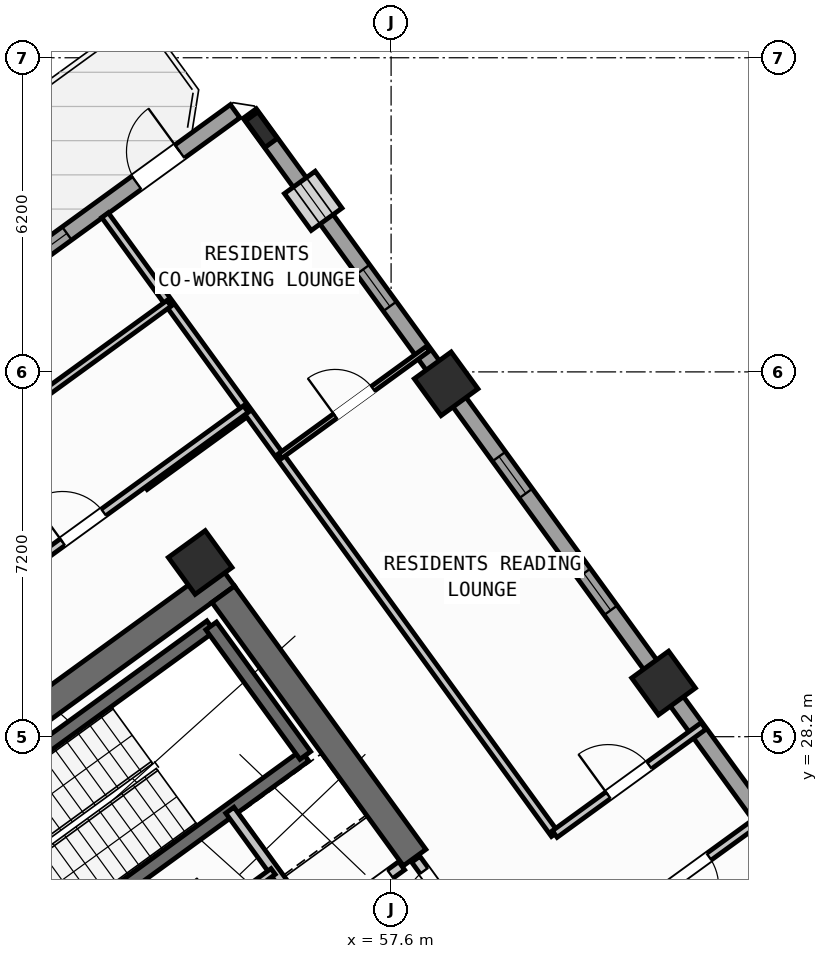
"""IFC4 building model, lengths in metres.
Left out: names, types, materials, properties, quantities, classifications, styles, units other than length and angle.
Written with IfcOpenShell. Run it as: python <this file> out.ifc"""

import sys

from ifc_helpers import new_model, si_unit, direction, frame, frame_2d, origin, origin_2d, place, context, subcontext, project, spatial, rectangle, hollow_rectangle, i_section, extrude, source, transform, mapped, element, fill, save


model = new_model("IFC4")
c1 = context("Model", 3, precision=1e-05, world=origin(), true_north=direction((0.0, 1.0)))
c2 = subcontext(c1, "Body", "Model", "MODEL_VIEW")
j1 = project(units=[si_unit("LENGTHUNIT", "METRE"), si_unit("PLANEANGLEUNIT", "RADIAN")], contexts=[c1])
p1 = place(None, origin())
s1 = spatial("IfcSite", under=j1, at=p1, CompositionType="ELEMENT")
p2 = place(p1, origin())
s2 = spatial("IfcBuilding", under=s1, at=p2, CompositionType="ELEMENT")
p3 = place(p2, frame((0.0, 0.0, 123.3)))
s3 = spatial("IfcBuildingStorey", under=s2, at=p3, CompositionType="ELEMENT", Elevation=123.3)
p4 = place(p3, frame((44.365, 24.142, 0.0), z_axis=(0.0, 0.0, 1.0), x_axis=(0.809024304885, 0.587775190107, 0.0)))
e1 = element("IfcWall", 1, at=p4, inside=s3, PredefinedType="SHEAR", context=c2, shape_type="SweptSolid", body=[
    extrude(rectangle(XDim=12.34, YDim=0.55, at=frame_2d((6.17, 0.0))), origin(), (0.0, 0.0, 1.0), 4.22),
])
p5 = place(p3, frame((58.064, 25.813, 0.0), z_axis=(0.0, 0.0, 1.0), x_axis=(-0.587764933797, 0.809031756236, 0.0)))
e2 = element("IfcWall", 2, at=p5, inside=s3, PredefinedType="SHEAR", context=c2, shape_type="SweptSolid", body=[
    extrude(rectangle(XDim=6.425, YDim=0.55, at=frame_2d((3.212, 0.0))), origin(), (0.0, 0.0, 1.0), 4.22),
])
m1 = source(origin(), c2, "Body", "SweptSolid", [
    extrude(hollow_rectangle(XDim=0.9, YDim=0.9, WallThickness=0.036, at=origin_2d()), origin(), (0.0, 0.0, 1.0), 4.5),
])
for number, where, z_axis, x_axis in (
    (3, (53.832, 31.638, 0.0), (0.0, 0.0, 1.0), (0.809, 0.588, 0.0)),
    (4, (62.977, 29.259, 0.0), (0.0, 0.0, 1.0), (0.809, 0.588, 0.0)),
    (5, (58.686, 35.165, 0.0), (0.0, 0.0, 1.0), (0.809, 0.588, 0.0)),
):
    element("IfcColumn", number, at=place(p3, frame(where, z_axis=z_axis, x_axis=x_axis)), inside=s3, PredefinedType="COLUMN", context=c2, shape_type="MappedRepresentation", body=[
        mapped(m1, transform((0.0, 0.0, 0.0), scale=1.0)),
    ])
m2 = source(origin(), c2, "Body", "SweptSolid", [
    extrude(i_section(OverallWidth=0.3, OverallDepth=0.65, WebThickness=0.016, FlangeThickness=0.031, at=origin_2d()), origin(), (0.0, 0.0, 1.0), 4.5),
])
p6 = place(p3, frame((55.042, 40.181, 0.0), z_axis=(0.0, 0.0, 1.0), x_axis=(0.809016994375, 0.587785252292, 0.0)))
e6 = element("IfcColumn", 6, at=p6, inside=s3, PredefinedType="COLUMN", context=c2, shape_type="MappedRepresentation", body=[
    mapped(m2, transform((0.0, 0.0, 0.0), scale=1.0)),
])
p7 = place(p3, frame((42.207, 31.597, 0.0), z_axis=(0.0, 0.0, 1.0), x_axis=(0.809020333377, 0.587780656523, 0.0)))
e7 = element("IfcWall", 7, at=p7, inside=s3, PredefinedType="STANDARD", context=c2, shape_type="SweptSolid", body=[
    extrude(rectangle(XDim=15.223, YDim=0.32, at=frame_2d((7.611, 0.0))), origin(), (0.0, 0.0, 1.0), 4.22),
])
p8 = place(p7, frame((12.82, 0.0, 0.0)))
e8 = element("IfcOpeningElement", 8, at=p8, cuts=e7, PredefinedType="OPENING", context=c2, shape_type="SweptSolid", body=[
    extrude(rectangle(XDim=1.05, YDim=2.15, at=frame_2d((0.525, 1.075))), frame((0.0, 0.17, 0.0), z_axis=(0.0, -1.0, 0.0), x_axis=(1.0, 0.0, 0.0)), (0.0, 0.0, 1.0), 0.34),
])
p9 = place(p7, frame((1.52, 0.0, 0.8)))
e9 = element("IfcOpeningElement", 9, at=p9, cuts=e7, PredefinedType="OPENING", context=c2, shape_type="SweptSolid", body=[
    extrude(rectangle(XDim=2.1, YDim=1.55, at=frame_2d((1.05, 0.775))), frame((0.0, 0.17, 0.0), z_axis=(0.0, -1.0, 0.0), x_axis=(1.0, 0.0, 0.0)), (0.0, 0.0, 1.0), 0.34),
])
p10 = place(p7, frame((5.76, 0.0, 0.8)))
e10 = element("IfcOpeningElement", 10, at=p10, cuts=e7, PredefinedType="OPENING", context=c2, shape_type="SweptSolid", body=[
    extrude(rectangle(XDim=2.1, YDim=1.55, at=frame_2d((1.05, 0.775))), frame((0.0, 0.17, 0.0), z_axis=(0.0, -1.0, 0.0), x_axis=(1.0, 0.0, 0.0)), (0.0, 0.0, 1.0), 0.34),
])
p11 = place(p7, frame((10.219, 0.0, 1.0)))
e11 = element("IfcOpeningElement", 11, at=p11, cuts=e7, PredefinedType="OPENING", context=c2, shape_type="SweptSolid", body=[
    extrude(rectangle(XDim=0.9, YDim=1.25, at=frame_2d((0.45, 0.625))), frame((0.0, 0.17, 0.0), z_axis=(0.0, -1.0, 0.0), x_axis=(1.0, 0.0, 0.0)), (0.0, 0.0, 1.0), 0.34),
])
p12 = place(p3, frame((54.81, 40.5, 0.0), z_axis=(0.0, 0.0, 1.0), x_axis=(0.587783625747, -0.809018176127, 0.0)))
e12 = element("IfcWall", 12, at=p12, inside=s3, PredefinedType="STANDARD", context=c2, shape_type="SweptSolid", body=[
    extrude(rectangle(XDim=21.587, YDim=0.32, at=frame_2d((10.794, 0.0))), origin(), (0.0, 0.0, 1.0), 2.395),
])
p13 = place(p12, frame((1.681, 0.0, 1.0)))
e13 = element("IfcOpeningElement", 13, at=p13, cuts=e12, PredefinedType="OPENING", context=c2, shape_type="SweptSolid", body=[
    extrude(rectangle(XDim=0.9, YDim=1.25, at=frame_2d((0.45, 0.625))), frame((0.0, 0.17, 0.0), z_axis=(0.0, -1.0, 0.0), x_axis=(1.0, 0.0, 0.0)), (0.0, 0.0, 1.0), 0.34),
])
p14 = place(p12, frame((3.805, 0.0, 1.0)))
e14 = element("IfcOpeningElement", 14, at=p14, cuts=e12, PredefinedType="OPENING", context=c2, shape_type="SweptSolid", body=[
    extrude(rectangle(XDim=0.9, YDim=1.25, at=frame_2d((0.45, 0.625))), frame((0.0, 0.17, 0.0), z_axis=(0.0, -1.0, 0.0), x_axis=(1.0, 0.0, 0.0)), (0.0, 0.0, 1.0), 0.34),
])
p15 = place(p12, frame((8.369, 0.0, 1.0)))
e15 = element("IfcOpeningElement", 15, at=p15, cuts=e12, PredefinedType="OPENING", context=c2, shape_type="SweptSolid", body=[
    extrude(rectangle(XDim=0.9, YDim=1.25, at=frame_2d((0.45, 0.625))), frame((0.0, 0.17, 0.0), z_axis=(0.0, -1.0, 0.0), x_axis=(1.0, 0.0, 0.0)), (0.0, 0.0, 1.0), 0.34),
])
p16 = place(p12, frame((11.219, 0.0, 1.0)))
e16 = element("IfcOpeningElement", 16, at=p16, cuts=e12, PredefinedType="OPENING", context=c2, shape_type="SweptSolid", body=[
    extrude(rectangle(XDim=0.9, YDim=1.25, at=frame_2d((0.45, 0.625))), frame((0.0, 0.17, 0.0), z_axis=(0.0, -1.0, 0.0), x_axis=(1.0, 0.0, 0.0)), (0.0, 0.0, 1.0), 0.34),
])
p17 = place(p12, frame((18.609, 0.0, 1.0)))
e17 = element("IfcOpeningElement", 17, at=p17, cuts=e12, PredefinedType="OPENING", context=c2, shape_type="SweptSolid", body=[
    extrude(rectangle(XDim=0.9, YDim=1.25, at=frame_2d((0.45, 0.625))), frame((0.0, 0.17, 0.0), z_axis=(0.0, -1.0, 0.0), x_axis=(1.0, 0.0, 0.0)), (0.0, 0.0, 1.0), 0.34),
])
p18 = place(p3, frame((48.006, 25.996, 0.0), z_axis=(0.0, 0.0, 1.0), x_axis=(0.80901903764, 0.587782439969, 0.0)))
e18 = element("IfcWall", 18, at=p18, inside=s3, PredefinedType="SHEAR", context=c2, shape_type="SweptSolid", body=[
    extrude(rectangle(XDim=7.46, YDim=0.26, at=frame_2d((3.73, 0.0))), origin(), (0.0, 0.0, 1.0), 4.22),
])
p19 = place(p3, frame((49.863, 23.44, 0.0), z_axis=(0.0, 0.0, 1.0), x_axis=(0.809003474932, 0.587803859759, 0.0)))
e19 = element("IfcWall", 19, at=p19, inside=s3, PredefinedType="SHEAR", context=c2, shape_type="SweptSolid", body=[
    extrude(rectangle(XDim=7.46, YDim=0.26, at=frame_2d((3.73, 0.0))), origin(), (0.0, 0.0, 1.0), 4.22),
])
p20 = place(p19, frame((0.36, 0.0, 0.0)))
e20 = element("IfcOpeningElement", 20, at=p20, cuts=e19, PredefinedType="OPENING", context=c2, shape_type="SweptSolid", body=[
    extrude(rectangle(XDim=0.86, YDim=2.05, at=frame_2d((0.43, 1.025))), frame((0.0, 0.14, 0.0), z_axis=(0.0, -1.0, 0.0), x_axis=(1.0, 0.0, 0.0)), (0.0, 0.0, 1.0), 0.28),
])
p21 = place(p3, frame((55.906, 27.831, 0.0), z_axis=(0.0, 0.0, 1.0), x_axis=(-0.587804123638, 0.809003283204, 0.0)))
e21 = element("IfcWall", 21, at=p21, inside=s3, PredefinedType="SHEAR", context=c2, shape_type="SweptSolid", body=[
    extrude(rectangle(XDim=3.16, YDim=0.26, at=frame_2d((1.58, 0.0))), origin(), (0.0, 0.0, 1.0), 4.22),
])
p22 = place(p3, frame((56.111, 24.419, 0.0), z_axis=(0.0, 0.0, 1.0), x_axis=(-0.58777848983, 0.809021907548, 0.0)))
e22 = element("IfcWall", 22, at=p22, inside=s3, PredefinedType="STANDARD", context=c2, shape_type="SweptSolid", body=[
    extrude(rectangle(XDim=2.88, YDim=0.2, at=frame_2d((1.44, 0.0))), origin(), (0.0, 0.0, 1.0), 4.21),
])
p23 = place(p3, frame((53.425, 22.468, 0.0), z_axis=(0.0, 0.0, 1.0), x_axis=(0.809024377198, 0.587775090574, 0.0)))
e23 = element("IfcWall", 23, at=p23, inside=s3, PredefinedType="STANDARD", context=c2, shape_type="SweptSolid", body=[
    extrude(rectangle(XDim=5.418, YDim=0.2, at=frame_2d((2.709, 0.0))), origin(), (0.0, 0.0, 1.0), 4.21),
])
p24 = place(p23, frame((4.28, 0.0, 0.0)))
e24 = element("IfcOpeningElement", 24, at=p24, cuts=e23, PredefinedType="OPENING", context=c2, shape_type="SweptSolid", body=[
    extrude(rectangle(XDim=0.86, YDim=2.05, at=frame_2d((0.43, 1.025))), frame((0.0, 0.11, 0.0), z_axis=(0.0, -1.0, 0.0), x_axis=(1.0, 0.0, 0.0)), (0.0, 0.0, 1.0), 0.22),
])
p25 = place(p23, frame((1.45, 0.0, 0.0)))
e25 = element("IfcOpeningElement", 25, at=p25, cuts=e23, PredefinedType="OPENING", context=c2, shape_type="SweptSolid", body=[
    extrude(rectangle(XDim=0.86, YDim=2.05, at=frame_2d((0.43, 1.025))), frame((0.0, 0.11, 0.0), z_axis=(0.0, -1.0, 0.0), x_axis=(1.0, 0.0, 0.0)), (0.0, 0.0, 1.0), 0.22),
])
p26 = place(p3, frame((52.618, 23.612, 0.0), z_axis=(0.0, 0.0, 1.0), x_axis=(0.809009587469, 0.587795446889, 0.0)))
e26 = element("IfcWall", 26, at=p26, inside=s3, PredefinedType="PLUMBINGWALL", context=c2, shape_type="SweptSolid", body=[
    extrude(rectangle(XDim=3.28, YDim=0.14, at=frame_2d((1.64, 0.0))), origin(), (0.0, 0.0, 1.0), 4.21),
])
p27 = place(p26, frame((1.2, 0.0, 0.0)))
e27 = element("IfcOpeningElement", 27, at=p27, cuts=e26, PredefinedType="OPENING", context=c2, shape_type="SweptSolid", body=[
    extrude(rectangle(XDim=0.78, YDim=2.05, at=frame_2d((0.39, 1.025))), frame((0.0, 0.08, 0.0), z_axis=(0.0, -1.0, 0.0), x_axis=(1.0, 0.0, 0.0)), (0.0, 0.0, 1.0), 0.16),
])
p28 = place(p3, frame((59.827, 23.386, 0.0), z_axis=(0.0, 0.0, 1.0), x_axis=(-0.587803840107, 0.809003489211, 0.0)))
e28 = element("IfcWall", 28, at=p28, inside=s3, PredefinedType="STANDARD", context=c2, shape_type="SweptSolid", body=[
    extrude(rectangle(XDim=2.96, YDim=0.2, at=frame_2d((1.48, 0.0))), origin(), (0.0, 0.0, 1.0), 2.395),
])
p29 = place(p28, frame((1.68, 0.0, 0.0)))
e29 = element("IfcOpeningElement", 29, at=p29, cuts=e28, PredefinedType="OPENING", context=c2, shape_type="SweptSolid", body=[
    extrude(rectangle(XDim=1.0, YDim=2.1, at=frame_2d((0.5, 1.05))), frame((0.0, 0.11, 0.0), z_axis=(0.0, -1.0, 0.0), x_axis=(1.0, 0.0, 0.0)), (0.0, 0.0, 1.0), 0.22),
])
p30 = place(p3, frame((52.739, 33.143, 0.0), z_axis=(0.0, 0.0, 1.0), x_axis=(0.809000999347, 0.58780726693, 0.0)))
e30 = element("IfcWall", 30, at=p30, inside=s3, PredefinedType="PARTITIONING", context=c2, shape_type="SweptSolid", body=[
    extrude(rectangle(XDim=2.51, YDim=0.16, at=frame_2d((1.255, 0.0))), origin(), (0.0, 0.0, 1.0), 4.21),
])
p31 = place(p3, frame((60.829, 26.278, 0.0), z_axis=(0.0, 0.0, 1.0), x_axis=(-0.587777474174, 0.809022645451, 0.0)))
e31 = element("IfcWall", 31, at=p31, inside=s3, PredefinedType="PARTITIONING", context=c2, shape_type="SweptSolid", body=[
    extrude(rectangle(XDim=15.1, YDim=0.16, at=frame_2d((7.55, 0.0))), origin(), (0.0, 0.0, 1.0), 4.21),
])
p32 = place(p3, frame((62.093, 24.538, 0.0), z_axis=(0.0, 0.0, 1.0), x_axis=(0.809035546126, 0.58775971715, 0.0)))
e32 = element("IfcWall", 32, at=p32, inside=s3, PredefinedType="PARTITIONING", context=c2, shape_type="SweptSolid", body=[
    extrude(rectangle(XDim=3.63, YDim=0.16, at=frame_2d((1.815, 0.0))), origin(), (0.0, 0.0, 1.0), 4.21),
])
p33 = place(p32, frame((1.2, 0.0, 0.0)))
e33 = element("IfcOpeningElement", 33, at=p33, cuts=e32, PredefinedType="OPENING", context=c2, shape_type="SweptSolid", body=[
    extrude(rectangle(XDim=1.0, YDim=2.1, at=frame_2d((0.5, 1.05))), frame((0.0, 0.09, 0.0), z_axis=(0.0, -1.0, 0.0), x_axis=(1.0, 0.0, 0.0)), (0.0, 0.0, 1.0), 0.18),
])
p34 = place(p3, frame((60.829, 26.278, 0.0), z_axis=(0.0, 0.0, 1.0), x_axis=(0.809003564202, 0.587803736896, 0.0)))
e34 = element("IfcWall", 34, at=p34, inside=s3, PredefinedType="PARTITIONING", context=c2, shape_type="SweptSolid", body=[
    extrude(rectangle(XDim=3.63, YDim=0.16, at=frame_2d((1.815, 0.0))), origin(), (0.0, 0.0, 1.0), 4.21),
])
p35 = place(p34, frame((1.305, 0.0, 0.0)))
e35 = element("IfcOpeningElement", 35, at=p35, cuts=e34, PredefinedType="OPENING", context=c2, shape_type="SweptSolid", body=[
    extrude(rectangle(XDim=1.0, YDim=2.1, at=frame_2d((0.5, 1.05))), frame((0.0, 0.09, 0.0), z_axis=(0.0, -1.0, 0.0), x_axis=(1.0, 0.0, 0.0)), (0.0, 0.0, 1.0), 0.18),
])
p36 = place(p3, frame((55.409, 33.738, 0.0), z_axis=(0.0, 0.0, 1.0), x_axis=(0.809005039917, 0.58780170584, 0.0)))
e36 = element("IfcWall", 36, at=p36, inside=s3, PredefinedType="PARTITIONING", context=c2, shape_type="SweptSolid", body=[
    extrude(rectangle(XDim=3.61, YDim=0.11, at=frame_2d((1.805, 0.0))), origin(), (0.0, 0.0, 1.0), 4.21),
])
p37 = place(p36, frame((1.345, 0.0, 0.0)))
e37 = element("IfcOpeningElement", 37, at=p37, cuts=e36, PredefinedType="OPENING", context=c2, shape_type="SweptSolid", body=[
    extrude(rectangle(XDim=0.92, YDim=2.08, at=frame_2d((0.46, 1.04))), frame((0.0, 0.065, 0.0), z_axis=(0.0, -1.0, 0.0), x_axis=(1.0, 0.0, 0.0)), (0.0, 0.0, 1.0), 0.13),
])
p38 = place(p3, frame((42.866, 26.044, 0.0), z_axis=(0.0, 0.0, 1.0), x_axis=(0.809020254154, 0.587780765566, 0.0)))
e38 = element("IfcWall", 38, at=p38, inside=s3, PredefinedType="PARTITIONING", context=c2, shape_type="SweptSolid", body=[
    extrude(rectangle(XDim=14.67, YDim=0.16, at=frame_2d((7.335, 0.0))), origin(), (0.0, 0.0, 1.0), 4.21),
])
p39 = place(p38, frame((10.2, 0.0, 0.0)))
e39 = element("IfcOpeningElement", 39, at=p39, cuts=e38, PredefinedType="OPENING", context=c2, shape_type="SweptSolid", body=[
    extrude(rectangle(XDim=1.0, YDim=2.1, at=frame_2d((0.5, 1.05))), frame((0.0, 0.09, 0.0), z_axis=(0.0, -1.0, 0.0), x_axis=(1.0, 0.0, 0.0)), (0.0, 0.0, 1.0), 0.18),
])
p40 = place(p3, frame((42.377, 28.878, 0.0), z_axis=(0.0, 0.0, 1.0), x_axis=(0.809020411523, 0.587780548963, 0.0)))
e40 = element("IfcWall", 40, at=p40, inside=s3, PredefinedType="PLUMBINGWALL", context=c2, shape_type="SweptSolid", body=[
    extrude(rectangle(XDim=13.4, YDim=0.14, at=frame_2d((6.7, 0.0))), origin(), (0.0, 0.0, 1.0), 4.21),
])
p41 = place(p40, frame((8.94, 0.0, 0.0)))
e41 = element("IfcOpeningElement", 41, at=p41, cuts=e40, PredefinedType="OPENING", context=c2, shape_type="SweptSolid", body=[
    extrude(rectangle(XDim=0.92, YDim=2.08, at=frame_2d((0.46, 1.04))), frame((0.0, 0.08, 0.0), z_axis=(0.0, -1.0, 0.0), x_axis=(1.0, 0.0, 0.0)), (0.0, 0.0, 1.0), 0.16),
])
m3 = source(origin(), c2, "Body", "SweptSolid", [
    extrude(rectangle(XDim=1.05, YDim=2.15, at=frame_2d((0.525, 1.075))), frame((0.0, 0.025, 0.0), z_axis=(0.0, -1.0, 0.0), x_axis=(1.0, 0.0, 0.0)), (0.0, 0.0, 1.0), 0.05),
])
p42 = place(p8, origin())
e42 = element("IfcDoor", 42, at=p42, inside=s3, OperationType="SINGLE_SWING_RIGHT", PredefinedType="DOOR", context=c2, shape_type="MappedRepresentation", body=[
    mapped(m3, transform((0.0, 0.0, 0.0), scale=1.0)),
])
fill(e8, e42)
m4 = source(origin(), c2, "Body", "SweptSolid", [
    extrude(rectangle(XDim=0.9, YDim=1.25, at=frame_2d((0.45, 0.625))), frame((0.0, 0.03, 0.0), z_axis=(0.0, -1.0, 0.0), x_axis=(1.0, 0.0, 0.0)), (0.0, 0.0, 1.0), 0.06),
])
p43 = place(p11, origin())
e43 = element("IfcWindow", 43, at=p43, inside=s3, PartitioningType="SINGLE_PANEL", PredefinedType="WINDOW", context=c2, shape_type="MappedRepresentation", body=[
    mapped(m4, transform((0.0, 0.0, 0.0), scale=1.0)),
])
fill(e11, e43)
p44 = place(p13, origin())
e44 = element("IfcWindow", 44, at=p44, inside=s3, PartitioningType="SINGLE_PANEL", PredefinedType="WINDOW", context=c2, shape_type="MappedRepresentation", body=[
    mapped(m4, transform((0.0, 0.0, 0.0), scale=1.0)),
])
fill(e13, e44)
p45 = place(p14, origin())
e45 = element("IfcWindow", 45, at=p45, inside=s3, PartitioningType="SINGLE_PANEL", PredefinedType="WINDOW", context=c2, shape_type="MappedRepresentation", body=[
    mapped(m4, transform((0.0, 0.0, 0.0), scale=1.0)),
])
fill(e14, e45)
p46 = place(p15, origin())
e46 = element("IfcWindow", 46, at=p46, inside=s3, PartitioningType="SINGLE_PANEL", PredefinedType="WINDOW", context=c2, shape_type="MappedRepresentation", body=[
    mapped(m4, transform((0.0, 0.0, 0.0), scale=1.0)),
])
fill(e15, e46)
p47 = place(p16, origin())
e47 = element("IfcWindow", 47, at=p47, inside=s3, PartitioningType="SINGLE_PANEL", PredefinedType="WINDOW", context=c2, shape_type="MappedRepresentation", body=[
    mapped(m4, transform((0.0, 0.0, 0.0), scale=1.0)),
])
fill(e16, e47)
m5 = source(origin(), c2, "Body", "SweptSolid", [
    extrude(rectangle(XDim=0.86, YDim=2.05, at=frame_2d((0.43, 1.025))), frame((0.0, 0.025, 0.0), z_axis=(0.0, -1.0, 0.0), x_axis=(1.0, 0.0, 0.0)), (0.0, 0.0, 1.0), 0.05),
])
p48 = place(p24, frame((0.86, 0.0, 0.0), z_axis=(0.0, 0.0, 1.0), x_axis=(-1.0, 0.0, 0.0)))
e48 = element("IfcDoor", 48, at=p48, inside=s3, OperationType="SINGLE_SWING_RIGHT", PredefinedType="DOOR", context=c2, shape_type="MappedRepresentation", body=[
    mapped(m5, transform((0.0, 0.0, 0.0), scale=1.0)),
])
fill(e24, e48)
m6 = source(origin(), c2, "Body", "SweptSolid", [
    extrude(rectangle(XDim=1.0, YDim=2.1, at=frame_2d((0.5, 1.05))), frame((0.0, 0.025, 0.0), z_axis=(0.0, -1.0, 0.0), x_axis=(1.0, 0.0, 0.0)), (0.0, 0.0, 1.0), 0.05),
])
p49 = place(p29, origin())
e49 = element("IfcDoor", 49, at=p49, inside=s3, OperationType="SINGLE_SWING_LEFT", PredefinedType="DOOR", context=c2, shape_type="MappedRepresentation", body=[
    mapped(m6, transform((0.0, 0.0, 0.0), scale=1.0)),
])
fill(e29, e49)
p50 = place(p35, origin())
e50 = element("IfcDoor", 50, at=p50, inside=s3, OperationType="SINGLE_SWING_LEFT", PredefinedType="DOOR", context=c2, shape_type="MappedRepresentation", body=[
    mapped(m6, transform((0.0, 0.0, 0.0), scale=1.0)),
])
fill(e35, e50)
m7 = source(origin(), c2, "Body", "SweptSolid", [
    extrude(rectangle(XDim=0.92, YDim=2.08, at=frame_2d((0.46, 1.04))), frame((0.0, 0.025, 0.0), z_axis=(0.0, -1.0, 0.0), x_axis=(1.0, 0.0, 0.0)), (0.0, 0.0, 1.0), 0.05),
])
p51 = place(p37, origin())
e51 = element("IfcDoor", 51, at=p51, inside=s3, OperationType="SINGLE_SWING_LEFT", PredefinedType="DOOR", context=c2, shape_type="MappedRepresentation", body=[
    mapped(m7, transform((0.0, 0.0, 0.0), scale=1.0)),
])
fill(e37, e51)
p52 = place(p33, frame((1.0, 0.0, 0.0), z_axis=(0.0, 0.0, 1.0), x_axis=(-1.0, 0.0, 0.0)))
e52 = element("IfcDoor", 52, at=p52, inside=s3, OperationType="SINGLE_SWING_RIGHT", PredefinedType="DOOR", context=c2, shape_type="MappedRepresentation", body=[
    mapped(m6, transform((0.0, 0.0, 0.0), scale=1.0)),
])
fill(e33, e52)
p53 = place(p39, origin())
e53 = element("IfcDoor", 53, at=p53, inside=s3, OperationType="SINGLE_SWING_LEFT", PredefinedType="DOOR", context=c2, shape_type="MappedRepresentation", body=[
    mapped(m6, transform((0.0, 0.0, 0.0), scale=1.0)),
])
fill(e39, e53)
save(model, sys.argv[1])
